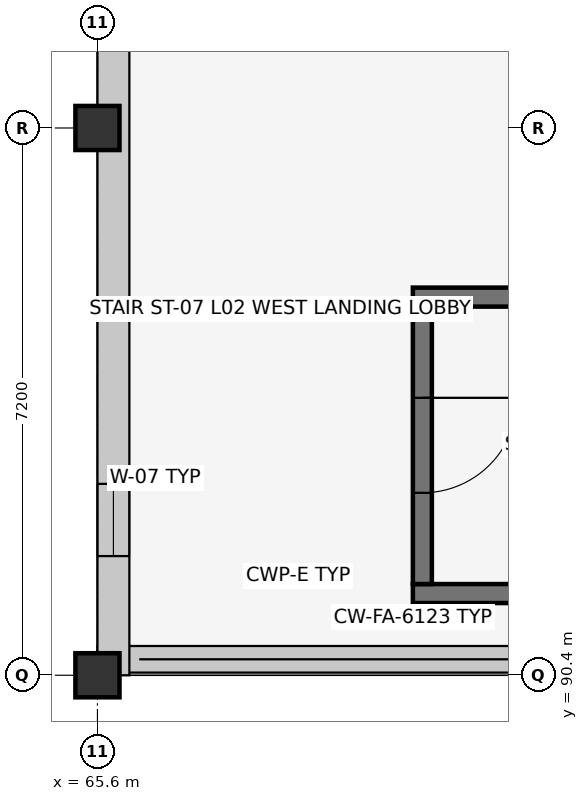
"""IFC4 building model, lengths in metres.
Left out: names, types, materials, properties, quantities, classifications, styles, units other than length and angle.
Written with IfcOpenShell. Run it as: python <this file> out.ifc"""

import sys

from ifc_helpers import new_model, si_unit, direction, frame, frame_2d, origin, origin_2d, place, context, subcontext, project, spatial, rectangle, extrude, element, fill, save


model = new_model("IFC4")
c1 = context("Model", 3, precision=1e-05, world=origin(), true_north=direction((0.0, 1.0)))
c2 = subcontext(c1, "Body", "Model", "MODEL_VIEW")
j1 = project(units=[si_unit("LENGTHUNIT", "METRE"), si_unit("PLANEANGLEUNIT", "RADIAN")], contexts=[c1])
p1 = place(None, origin())
s1 = spatial("IfcSite", under=j1, at=p1, CompositionType="ELEMENT")
p2 = place(p1, origin())
s2 = spatial("IfcBuilding", under=s1, at=p2, CompositionType="ELEMENT")
p3 = place(p2, frame((0.0, 0.0, 9.6)))
s3 = spatial("IfcBuildingStorey", under=s2, at=p3, CompositionType="ELEMENT", Elevation=9.6)
for number, where, z_axis, x_axis in (
    (1, (65.6, 90.4, 0.0), (0.0, 0.0, 1.0), (1.0, 0.0, 0.0)),
    (2, (65.6, 97.6, 0.0), (0.0, 0.0, 1.0), (1.0, 0.0, 0.0)),
):
    element("IfcColumn", number, at=place(p3, frame(where, z_axis=z_axis, x_axis=x_axis)), inside=s3, PredefinedType="COLUMN", context=c2, shape_type="SweptSolid", body=[
        extrude(rectangle(XDim=0.58, YDim=0.58, at=origin_2d()), origin(), (0.0, 0.0, 1.0), 4.2),
    ])
p4 = place(p3, frame((108.8, 90.61, 0.0), z_axis=(0.0, 0.0, 1.0), x_axis=(-1.0, 0.0, 0.0)))
e3 = element("IfcWall", 3, at=p4, inside=s3, PredefinedType="SOLIDWALL", context=c2, shape_type="SweptSolid", body=[
    extrude(rectangle(XDim=43.2, YDim=0.35, at=frame_2d((21.6, 0.0))), origin(), (0.0, 0.0, 1.0), 0.85),
])
p5 = place(p3, frame((65.81, 90.4, 0.0), z_axis=(0.0, 0.0, 1.0), x_axis=(0.0, 1.0, 0.0)))
e4 = element("IfcWall", 4, at=p5, inside=s3, PredefinedType="SOLIDWALL", context=c2, shape_type="SweptSolid", body=[
    extrude(rectangle(XDim=28.6, YDim=0.42, at=frame_2d((14.3, 0.0))), origin(), (0.0, 0.0, 1.0), 3.315),
])
p6 = place(p5, frame((1.568, 0.0, 0.9)))
e5 = element("IfcOpeningElement", 5, at=p6, cuts=e4, PredefinedType="OPENING", context=c2, shape_type="SweptSolid", body=[
    extrude(rectangle(XDim=0.95, YDim=1.45, at=frame_2d((0.475, 0.725))), frame((0.0, 0.222, 0.0), z_axis=(0.0, -1.0, 0.0), x_axis=(1.0, 0.0, 0.0)), (0.0, 0.0, 1.0), 0.444),
])
p7 = place(p5, frame((17.711, 0.0, 0.9)))
e6 = element("IfcOpeningElement", 6, at=p7, cuts=e4, PredefinedType="OPENING", context=c2, shape_type="SweptSolid", body=[
    extrude(rectangle(XDim=1.35, YDim=1.45, at=frame_2d((0.675, 0.725))), frame((0.0, 0.222, 0.0), z_axis=(0.0, -1.0, 0.0), x_axis=(1.0, 0.0, 0.0)), (0.0, 0.0, 1.0), 0.444),
])
p8 = place(p5, frame((26.107, 0.0, 0.9)))
e7 = element("IfcOpeningElement", 7, at=p8, cuts=e4, PredefinedType="OPENING", context=c2, shape_type="SweptSolid", body=[
    extrude(rectangle(XDim=0.9, YDim=1.6, at=frame_2d((0.45, 0.8))), frame((0.0, 0.222, 0.0), z_axis=(0.0, -1.0, 0.0), x_axis=(1.0, 0.0, 0.0)), (0.0, 0.0, 1.0), 0.444),
])
p9 = place(p3, frame((69.75, 91.475, 0.0), z_axis=(0.0, 0.0, 1.0), x_axis=(1.0, 0.0, 0.0)))
e8 = element("IfcWall", 8, at=p9, inside=s3, PredefinedType="SHEAR", context=c2, shape_type="SweptSolid", body=[
    extrude(rectangle(XDim=9.57, YDim=0.25, at=frame_2d((4.785, 0.0))), origin(), (0.0, 0.0, 1.0), 3.92),
])
p10 = place(p3, frame((78.75, 95.375, 0.0), z_axis=(0.0, 0.0, 1.0), x_axis=(-1.0, 0.0, 0.0)))
e9 = element("IfcWall", 9, at=p10, inside=s3, PredefinedType="SHEAR", context=c2, shape_type="SweptSolid", body=[
    extrude(rectangle(XDim=9.0, YDim=0.25, at=frame_2d((4.5, 0.0))), origin(), (0.0, 0.0, 1.0), 3.92),
])
p11 = place(p3, frame((69.875, 95.25, 0.0), z_axis=(0.0, 0.0, 1.0), x_axis=(0.0, -1.0, 0.0)))
e10 = element("IfcWall", 10, at=p11, inside=s3, PredefinedType="SHEAR", context=c2, shape_type="SweptSolid", body=[
    extrude(rectangle(XDim=3.65, YDim=0.25, at=frame_2d((1.825, 0.0))), origin(), (0.0, 0.0, 1.0), 3.92),
])
p12 = place(p11, frame((1.2, 0.0, 0.0)))
e11 = element("IfcOpeningElement", 11, at=p12, cuts=e10, PredefinedType="OPENING", context=c2, shape_type="SweptSolid", body=[
    extrude(rectangle(XDim=1.25, YDim=2.15, at=frame_2d((0.625, 1.075))), frame((0.0, 0.137, 0.0), z_axis=(0.0, -1.0, 0.0), x_axis=(1.0, 0.0, 0.0)), (0.0, 0.0, 1.0), 0.274),
])
p13 = place(p6, origin())
e12 = element("IfcWindow", 12, at=p13, inside=s3, PartitioningType="SINGLE_PANEL", PredefinedType="WINDOW", context=c2, shape_type="SweptSolid", body=[
    extrude(rectangle(XDim=0.95, YDim=1.45, at=frame_2d((0.475, 0.725))), frame((0.0, 0.03, 0.0), z_axis=(0.0, -1.0, 0.0), x_axis=(1.0, 0.0, 0.0)), (0.0, 0.0, 1.0), 0.06),
])
fill(e5, e12)
p14 = place(p12, origin())
e13 = element("IfcDoor", 13, at=p14, inside=s3, OperationType="SINGLE_SWING_LEFT", PredefinedType="DOOR", context=c2, shape_type="SweptSolid", body=[
    extrude(rectangle(XDim=1.25, YDim=2.15, at=frame_2d((0.625, 1.075))), frame((0.0, 0.025, 0.0), z_axis=(0.0, -1.0, 0.0), x_axis=(1.0, 0.0, 0.0)), (0.0, 0.0, 1.0), 0.05),
])
fill(e11, e13)
save(model, sys.argv[1])
